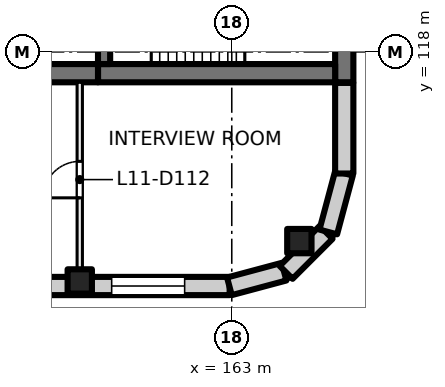
"""IFC4 building model, lengths in metres.
Left out: names, types, materials, properties, quantities, classifications, styles, units other than length and angle.
Written with IfcOpenShell. Run it as: python <this file> out.ifc"""

import sys

from ifc_helpers import new_model, si_unit, direction, frame, frame_2d, origin, origin_2d, place, context, subcontext, project, spatial, rectangle, extrude, element, fill, save


model = new_model("IFC4")
c1 = context("Model", 3, precision=1e-05, world=origin(), true_north=direction((0.0, 1.0)))
c2 = subcontext(c1, "Body", "Model", "MODEL_VIEW")
j1 = project(units=[si_unit("LENGTHUNIT", "METRE"), si_unit("PLANEANGLEUNIT", "RADIAN")], contexts=[c1])
p1 = place(None, origin())
s1 = spatial("IfcSite", under=j1, at=p1, CompositionType="ELEMENT")
p2 = place(p1, origin())
s2 = spatial("IfcBuilding", under=s1, at=p2, CompositionType="ELEMENT")
p3 = place(p2, frame((0.0, 0.0, 51.5)))
s3 = spatial("IfcBuildingStorey", under=s2, at=p3, CompositionType="ELEMENT", Elevation=51.5)
for number, where, z_axis, x_axis in (
    (1, (165.223, 111.777, 0.0), (0.0, 0.0, 1.0), (1.0, 0.0, 0.0)),
    (2, (158.0, 110.45, 0.0), (0.0, 0.0, 1.0), (1.0, 0.0, 0.0)),
):
    element("IfcColumn", number, at=place(p3, frame(where, z_axis=z_axis, x_axis=x_axis)), inside=s3, PredefinedType="COLUMN", context=c2, shape_type="SweptSolid", body=[
        extrude(rectangle(XDim=0.8, YDim=0.8, at=origin_2d()), origin(), (0.0, 0.0, 1.0), 4.0),
    ])
p4 = place(p3, frame((166.7, 120.8, 0.0), z_axis=(0.0, 0.0, 1.0), x_axis=(0.0, -1.0, 0.0)))
e3 = element("IfcWall", 3, at=p4, inside=s3, PredefinedType="SHEAR", context=c2, shape_type="SweptSolid", body=[
    extrude(rectangle(XDim=3.8, YDim=0.6, at=frame_2d((1.9, 0.0))), origin(), (0.0, 0.0, 1.0), 4.0),
])
p5 = place(p3, frame((166.4, 117.3, 0.0), z_axis=(0.0, 0.0, 1.0), x_axis=(-1.0, 0.0, 0.0)))
e4 = element("IfcWall", 4, at=p5, inside=s3, PredefinedType="SHEAR", context=c2, shape_type="SweptSolid", body=[
    extrude(rectangle(XDim=7.8, YDim=0.6, at=frame_2d((3.9, 0.0))), origin(), (0.0, 0.0, 1.0), 4.0),
])
p6 = place(p3, frame((158.6, 117.3, 0.0), z_axis=(0.0, 0.0, 1.0), x_axis=(-1.0, 0.0, 0.0)))
e5 = element("IfcWall", 5, at=p6, inside=s3, PredefinedType="SHEAR", context=c2, shape_type="SweptSolid", body=[
    extrude(rectangle(XDim=4.6, YDim=0.6, at=frame_2d((2.3, 0.0))), origin(), (0.0, 0.0, 1.0), 4.0),
])
p7 = place(p3, frame((158.8, 120.4, 0.0), z_axis=(0.0, 0.0, 1.0), x_axis=(0.0, -1.0, 0.0)))
e6 = element("IfcWall", 6, at=p7, inside=s3, PredefinedType="SHEAR", context=c2, shape_type="SweptSolid", body=[
    extrude(rectangle(XDim=2.8, YDim=0.4, at=frame_2d((1.4, 0.0))), origin(), (0.0, 0.0, 1.0), 4.0),
])
p8 = place(p7, frame((0.9, 0.0, 0.0)))
e7 = element("IfcOpeningElement", 7, at=p8, cuts=e6, PredefinedType="OPENING", context=c2, shape_type="SweptSolid", body=[
    extrude(rectangle(XDim=1.0, YDim=2.1, at=frame_2d((0.5, 1.05))), frame((0.0, 0.21, 0.0), z_axis=(0.0, -1.0, 0.0), x_axis=(1.0, 0.0, 0.0)), (0.0, 0.0, 1.0), 0.42),
])
p9 = place(p3, frame((162.93, 110.3, 0.0), z_axis=(0.0, 0.0, 1.0), x_axis=(-1.0, 0.0, 0.0)))
e8 = element("IfcWall", 8, at=p9, inside=s3, PredefinedType="SOLIDWALL", context=c2, shape_type="SweptSolid", body=[
    extrude(rectangle(XDim=31.93, YDim=0.6, at=frame_2d((15.965, 0.0))), origin(), (0.0, 0.0, 1.0), 3.625),
])
p10 = place(p9, frame((1.48, 0.0, 0.9)))
e9 = element("IfcOpeningElement", 9, at=p10, cuts=e8, PredefinedType="OPENING", context=c2, shape_type="SweptSolid", body=[
    extrude(rectangle(XDim=2.4, YDim=2.4, at=frame_2d((1.2, 1.2))), frame((0.0, 0.31, 0.0), z_axis=(0.0, -1.0, 0.0), x_axis=(1.0, 0.0, 0.0)), (0.0, 0.0, 1.0), 0.62),
])
p11 = place(p9, frame((5.98, 0.0, 0.9)))
e10 = element("IfcOpeningElement", 10, at=p11, cuts=e8, PredefinedType="OPENING", context=c2, shape_type="SweptSolid", body=[
    extrude(rectangle(XDim=2.4, YDim=2.4, at=frame_2d((1.2, 1.2))), frame((0.0, 0.31, 0.0), z_axis=(0.0, -1.0, 0.0), x_axis=(1.0, 0.0, 0.0)), (0.0, 0.0, 1.0), 0.62),
])
p12 = place(p9, frame((10.48, 0.0, 0.9)))
e11 = element("IfcOpeningElement", 11, at=p12, cuts=e8, PredefinedType="OPENING", context=c2, shape_type="SweptSolid", body=[
    extrude(rectangle(XDim=2.4, YDim=2.4, at=frame_2d((1.2, 1.2))), frame((0.0, 0.31, 0.0), z_axis=(0.0, -1.0, 0.0), x_axis=(1.0, 0.0, 0.0)), (0.0, 0.0, 1.0), 0.62),
])
p13 = place(p9, frame((14.98, 0.0, 0.9)))
e12 = element("IfcOpeningElement", 12, at=p13, cuts=e8, PredefinedType="OPENING", context=c2, shape_type="SweptSolid", body=[
    extrude(rectangle(XDim=2.4, YDim=2.4, at=frame_2d((1.2, 1.2))), frame((0.0, 0.31, 0.0), z_axis=(0.0, -1.0, 0.0), x_axis=(1.0, 0.0, 0.0)), (0.0, 0.0, 1.0), 0.62),
])
p14 = place(p9, frame((19.48, 0.0, 0.9)))
e13 = element("IfcOpeningElement", 13, at=p14, cuts=e8, PredefinedType="OPENING", context=c2, shape_type="SweptSolid", body=[
    extrude(rectangle(XDim=2.4, YDim=2.4, at=frame_2d((1.2, 1.2))), frame((0.0, 0.31, 0.0), z_axis=(0.0, -1.0, 0.0), x_axis=(1.0, 0.0, 0.0)), (0.0, 0.0, 1.0), 0.62),
])
p15 = place(p9, frame((23.98, 0.0, 0.9)))
e14 = element("IfcOpeningElement", 14, at=p15, cuts=e8, PredefinedType="OPENING", context=c2, shape_type="SweptSolid", body=[
    extrude(rectangle(XDim=2.4, YDim=2.4, at=frame_2d((1.2, 1.2))), frame((0.0, 0.31, 0.0), z_axis=(0.0, -1.0, 0.0), x_axis=(1.0, 0.0, 0.0)), (0.0, 0.0, 1.0), 0.62),
])
p16 = place(p9, frame((28.48, 0.0, 0.9)))
e15 = element("IfcOpeningElement", 15, at=p16, cuts=e8, PredefinedType="OPENING", context=c2, shape_type="SweptSolid", body=[
    extrude(rectangle(XDim=2.4, YDim=2.4, at=frame_2d((1.2, 1.2))), frame((0.0, 0.31, 0.0), z_axis=(0.0, -1.0, 0.0), x_axis=(1.0, 0.0, 0.0)), (0.0, 0.0, 1.0), 0.62),
])
for number, where, z_axis, x_axis in (
    (16, (164.719, 110.771, 0.0), (0.0, 0.0, 1.0), (-0.966, -0.259, 0.0)),
    (17, (166.104, 112.064, 0.0), (0.0, 0.0, 1.0), (-0.707, -0.707, 0.0)),
):
    element("IfcWall", number, at=place(p3, frame(where, z_axis=z_axis, x_axis=x_axis)), inside=s3, PredefinedType="SOLIDWALL", context=c2, shape_type="SweptSolid", body=[
        extrude(rectangle(XDim=1.861, YDim=0.6, at=frame_2d((0.93, 0.0))), origin(), (0.0, 0.0, 1.0), 3.625),
    ])
p17 = place(p3, frame((166.692, 114.01, 0.0), z_axis=(0.0, 0.0, 1.0), x_axis=(-0.258839784042, -0.965920269068, 0.0)))
e18 = element("IfcWall", 18, at=p17, inside=s3, PredefinedType="SOLIDWALL", context=c2, shape_type="SweptSolid", body=[
    extrude(rectangle(XDim=2.0, YDim=0.6, at=frame_2d((1.0, 0.0))), origin(), (0.0, 0.0, 1.0), 3.625),
])
p18 = place(p3, frame((166.7, 116.98, 0.0), z_axis=(0.0, 0.0, 1.0), x_axis=(0.0, -1.0, 0.0)))
e19 = element("IfcWall", 19, at=p18, inside=s3, PredefinedType="SOLIDWALL", context=c2, shape_type="SweptSolid", body=[
    extrude(rectangle(XDim=2.98, YDim=0.6, at=frame_2d((1.49, 0.0))), origin(), (0.0, 0.0, 1.0), 3.625),
])
p19 = place(p3, frame((158.0, 110.6, 0.0), z_axis=(0.0, 0.0, 1.0), x_axis=(0.0, 1.0, 0.0)))
e20 = element("IfcWall", 20, at=p19, inside=s3, PredefinedType="PARTITIONING", context=c2, shape_type="SweptSolid", body=[
    extrude(rectangle(XDim=6.4, YDim=0.175, at=frame_2d((3.2, 0.0))), origin(), (0.0, 0.0, 1.0), 3.625),
])
p20 = place(p19, frame((2.6, 0.0, 0.0)))
e21 = element("IfcOpeningElement", 21, at=p20, cuts=e20, PredefinedType="OPENING", context=c2, shape_type="SweptSolid", body=[
    extrude(rectangle(XDim=1.2, YDim=2.1, at=frame_2d((0.6, 1.05))), frame((0.0, 0.097, 0.0), z_axis=(0.0, -1.0, 0.0), x_axis=(1.0, 0.0, 0.0)), (0.0, 0.0, 1.0), 0.195),
])
p21 = place(p10, origin())
e22 = element("IfcWindow", 22, at=p21, inside=s3, PartitioningType="SINGLE_PANEL", PredefinedType="WINDOW", context=c2, shape_type="SweptSolid", body=[
    extrude(rectangle(XDim=2.4, YDim=2.4, at=frame_2d((1.2, 1.2))), frame((0.0, 0.03, 0.0), z_axis=(0.0, -1.0, 0.0), x_axis=(1.0, 0.0, 0.0)), (0.0, 0.0, 1.0), 0.06),
])
fill(e9, e22)
p22 = place(p20, origin())
e23 = element("IfcDoor", 23, at=p22, inside=s3, OperationType="DOUBLE_DOOR_SINGLE_SWING", PredefinedType="DOOR", context=c2, shape_type="SweptSolid", body=[
    extrude(rectangle(XDim=1.2, YDim=2.1, at=frame_2d((0.6, 1.05))), frame((0.0, 0.025, 0.0), z_axis=(0.0, -1.0, 0.0), x_axis=(1.0, 0.0, 0.0)), (0.0, 0.0, 1.0), 0.05),
])
fill(e21, e23)
save(model, sys.argv[1])
